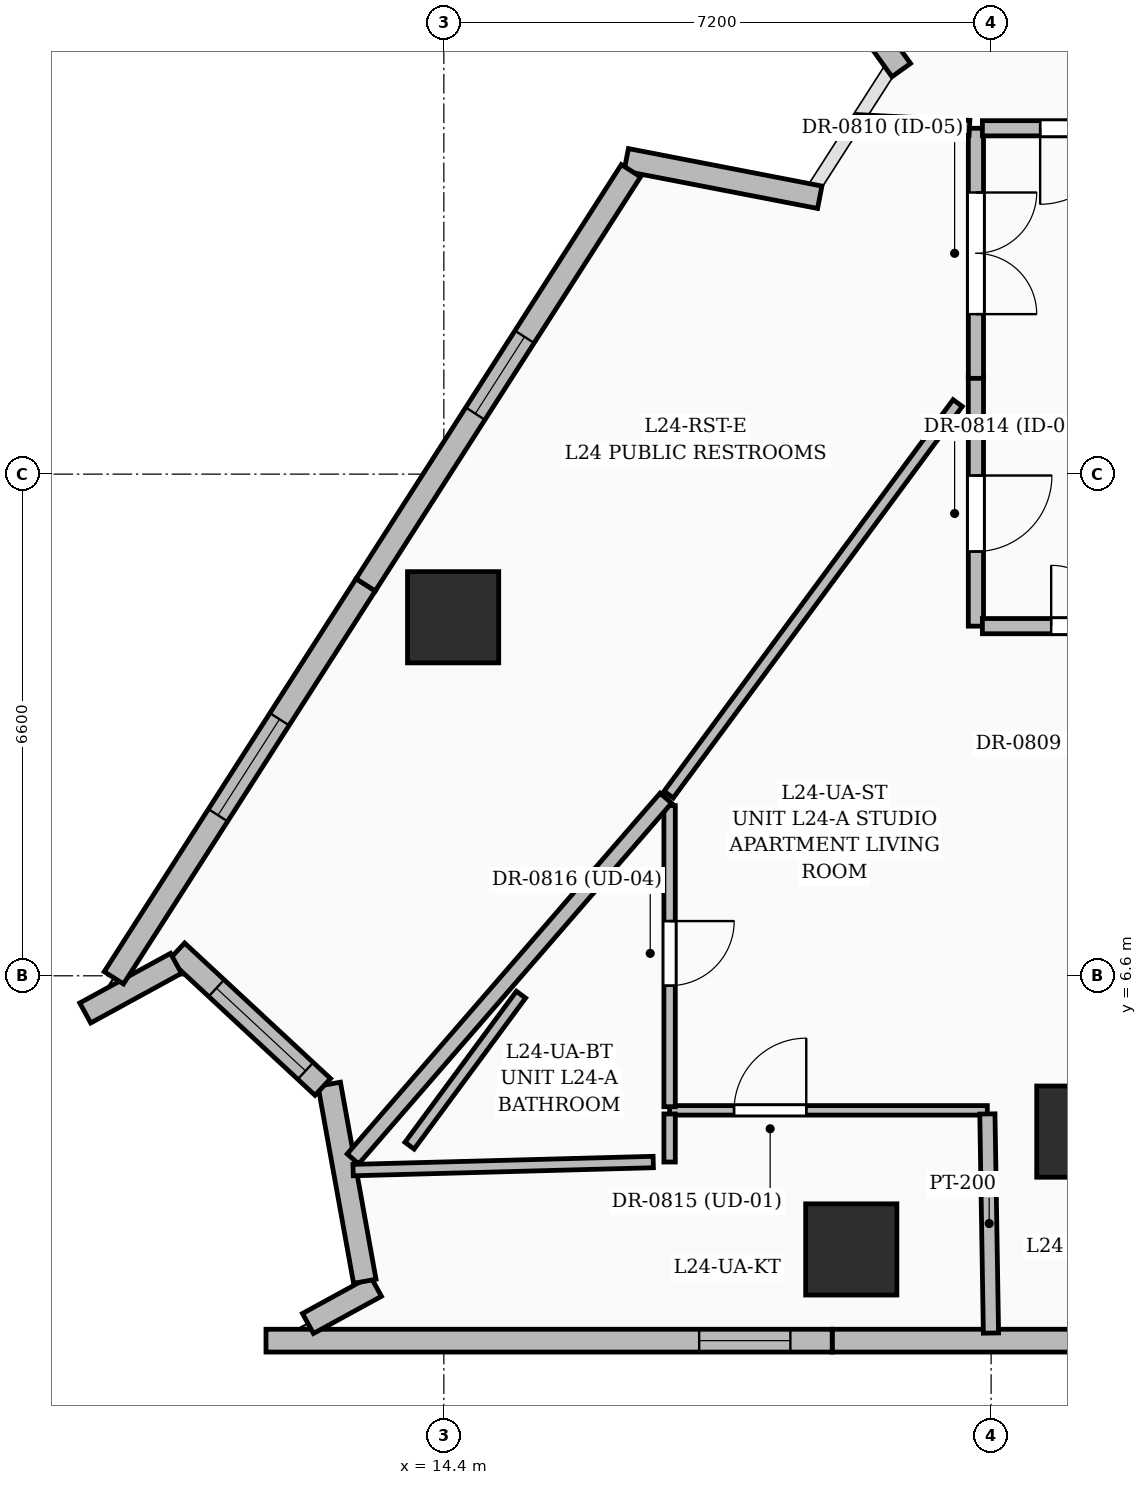
"""IFC4 building model, lengths in metres.
Left out: names, types, materials, properties, quantities, classifications, styles, units other than length and angle.
Written with IfcOpenShell. Run it as: python <this file> out.ifc"""

import sys

from ifc_helpers import new_model, si_unit, direction, frame, frame_2d, origin, origin_2d, place, context, subcontext, project, spatial, rectangle, extrude, element, fill, save


model = new_model("IFC4")
c1 = context("Model", 3, precision=1e-05, world=origin(), true_north=direction((0.0, 1.0)))
c2 = subcontext(c1, "Body", "Model", "MODEL_VIEW")
j1 = project(units=[si_unit("LENGTHUNIT", "METRE"), si_unit("PLANEANGLEUNIT", "RADIAN")], contexts=[c1])
p1 = place(None, origin())
s1 = spatial("IfcSite", under=j1, at=p1, CompositionType="ELEMENT")
p2 = place(p1, origin())
s2 = spatial("IfcBuilding", under=s1, at=p2, CompositionType="ELEMENT")
p3 = place(p2, frame((0.0, 0.0, 96.6)))
s3 = spatial("IfcBuildingStorey", under=s2, at=p3, CompositionType="ELEMENT", Elevation=96.6)
for number, where, z_axis, x_axis in (
    (1, (22.8, 4.55, 0.0), (0.0, 0.0, 1.0), (1.0, 0.0, 0.0)),
    (2, (19.76, 3.0, 0.0), (0.0, 0.0, 1.0), (1.0, 0.0, 0.0)),
    (3, (14.522, 11.317, 0.0), (0.0, 0.0, 1.0), (1.0, 0.0, 0.0)),
):
    element("IfcColumn", number, at=place(p3, frame(where, z_axis=z_axis, x_axis=x_axis)), inside=s3, PredefinedType="COLUMN", context=c2, shape_type="SweptSolid", body=[
        extrude(rectangle(XDim=1.2, YDim=1.2, at=origin_2d()), origin(), (0.0, 0.0, 1.0), 3.6),
    ])
p4 = place(p3, frame((16.8, 17.336, 0.0), z_axis=(0.0, 0.0, 1.0), x_axis=(0.981732795781, -0.190264861936, 0.0)))
e4 = element("IfcWall", 4, at=p4, inside=s3, PredefinedType="SOLIDWALL", context=c2, shape_type="SweptSolid", body=[
    extrude(rectangle(XDim=2.593, YDim=0.3, at=frame_2d((1.297, 0.0))), origin(), (0.0, 0.0, 1.0), 2.325),
])
p5 = place(p3, frame((20.417, 18.515, 0.0), z_axis=(0.0, 0.0, 1.0), x_axis=(-0.582937596749, 0.812516928006, 0.0)))
e5 = element("IfcWall", 5, at=p5, inside=s3, PredefinedType="SOLIDWALL", context=c2, shape_type="SweptSolid", body=[
    extrude(rectangle(XDim=2.594, YDim=0.3, at=frame_2d((1.297, 0.0))), origin(), (0.0, 0.0, 1.0), 2.325),
])
p6 = place(p3, frame((26.958, 1.8, 0.0), z_axis=(0.0, 0.0, 1.0), x_axis=(-1.0, 0.0, 0.0)))
e6 = element("IfcWall", 6, at=p6, inside=s3, PredefinedType="SOLIDWALL", context=c2, shape_type="SweptSolid", body=[
    extrude(rectangle(XDim=7.449, YDim=0.3, at=frame_2d((3.725, 0.0))), origin(), (0.0, 0.0, 1.0), 3.3),
])
p7 = place(p6, frame((2.025, 0.0, 0.6)))
e7 = element("IfcOpeningElement", 7, at=p7, cuts=e6, PredefinedType="OPENING", context=c2, shape_type="SweptSolid", body=[
    extrude(rectangle(XDim=1.5, YDim=2.1, at=frame_2d((0.75, 1.05))), frame((0.0, 0.16, 0.0), z_axis=(0.0, -1.0, 0.0), x_axis=(1.0, 0.0, 0.0)), (0.0, 0.0, 1.0), 0.32),
])
p8 = place(p3, frame((19.509, 1.8, 0.0), z_axis=(0.0, 0.0, 1.0), x_axis=(-1.0, 0.0, 0.0)))
e8 = element("IfcWall", 8, at=p8, inside=s3, PredefinedType="SOLIDWALL", context=c2, shape_type="SweptSolid", body=[
    extrude(rectangle(XDim=7.449, YDim=0.3, at=frame_2d((3.725, 0.0))), origin(), (0.0, 0.0, 1.0), 3.3),
])
p9 = place(p8, frame((0.55, 0.0, 0.8)))
e9 = element("IfcOpeningElement", 9, at=p9, cuts=e8, PredefinedType="OPENING", context=c2, shape_type="SweptSolid", body=[
    extrude(rectangle(XDim=1.2, YDim=1.8, at=frame_2d((0.6, 0.9))), frame((0.0, 0.16, 0.0), z_axis=(0.0, -1.0, 0.0), x_axis=(1.0, 0.0, 0.0)), (0.0, 0.0, 1.0), 0.32),
])
p10 = place(p3, frame((12.612, 2.026, 0.0), z_axis=(0.0, 0.0, 1.0), x_axis=(0.877245120991, 0.480042704036, 0.0)))
e10 = element("IfcWall", 10, at=p10, inside=s3, PredefinedType="SOLIDWALL", context=c2, shape_type="SweptSolid", body=[
    extrude(rectangle(XDim=1.02, YDim=0.3, at=frame_2d((0.51, 0.0))), origin(), (0.0, 0.0, 1.0), 3.3),
])
p11 = place(p3, frame((13.36, 2.581, 0.0), z_axis=(0.0, 0.0, 1.0), x_axis=(-0.177621463404, 0.984098885142, 0.0)))
e11 = element("IfcWall", 11, at=p11, inside=s3, PredefinedType="SOLIDWALL", context=c2, shape_type="SweptSolid", body=[
    extrude(rectangle(XDim=2.635, YDim=0.3, at=frame_2d((1.317, 0.0))), origin(), (0.0, 0.0, 1.0), 3.3),
])
p12 = place(p3, frame((12.807, 5.138, 0.0), z_axis=(0.0, 0.0, 1.0), x_axis=(-0.732670686937, 0.680583326642, 0.0)))
e12 = element("IfcWall", 12, at=p12, inside=s3, PredefinedType="SOLIDWALL", context=c2, shape_type="SweptSolid", body=[
    extrude(rectangle(XDim=2.62, YDim=0.3, at=frame_2d((1.31, 0.0))), origin(), (0.0, 0.0, 1.0), 3.3),
])
p13 = place(p12, frame((0.31, 0.0, 0.55)))
e13 = element("IfcOpeningElement", 13, at=p13, cuts=e12, PredefinedType="OPENING", context=c2, shape_type="SweptSolid", body=[
    extrude(rectangle(XDim=1.6, YDim=2.2, at=frame_2d((0.8, 1.1))), frame((0.0, 0.16, 0.0), z_axis=(0.0, -1.0, 0.0), x_axis=(1.0, 0.0, 0.0)), (0.0, 0.0, 1.0), 0.32),
])
p14 = place(p3, frame((10.876, 6.764, 0.0), z_axis=(0.0, 0.0, 1.0), x_axis=(-0.877387661902, -0.47978212841, 0.0)))
e14 = element("IfcWall", 14, at=p14, inside=s3, PredefinedType="SOLIDWALL", context=c2, shape_type="SweptSolid", body=[
    extrude(rectangle(XDim=1.361, YDim=0.3, at=frame_2d((0.68, 0.0))), origin(), (0.0, 0.0, 1.0), 3.3),
])
p15 = place(p3, frame((10.059, 6.574, 0.0), z_axis=(0.0, 0.0, 1.0), x_axis=(0.539504958898, 0.841982422218, 0.0)))
e15 = element("IfcWall", 15, at=p15, inside=s3, PredefinedType="SOLIDWALL", context=c2, shape_type="SweptSolid", body=[
    extrude(rectangle(XDim=6.14, YDim=0.3, at=frame_2d((3.07, 0.0))), origin(), (0.0, 0.0, 1.0), 3.3),
])
p16 = place(p15, frame((2.54, 0.0, 0.6)))
e16 = element("IfcOpeningElement", 16, at=p16, cuts=e15, PredefinedType="OPENING", context=c2, shape_type="SweptSolid", body=[
    extrude(rectangle(XDim=1.5, YDim=2.1, at=frame_2d((0.75, 1.05))), frame((0.0, 0.16, 0.0), z_axis=(0.0, -1.0, 0.0), x_axis=(1.0, 0.0, 0.0)), (0.0, 0.0, 1.0), 0.32),
])
p17 = place(p3, frame((13.371, 11.743, 0.0), z_axis=(0.0, 0.0, 1.0), x_axis=(0.539456253254, 0.842013628646, 0.0)))
e17 = element("IfcWall", 17, at=p17, inside=s3, PredefinedType="SOLIDWALL", context=c2, shape_type="SweptSolid", body=[
    extrude(rectangle(XDim=6.47, YDim=0.3, at=frame_2d((3.235, 0.0))), origin(), (0.0, 0.0, 1.0), 3.3),
])
p18 = place(p17, frame((2.675, 0.0, 0.8)))
e18 = element("IfcOpeningElement", 18, at=p18, cuts=e17, PredefinedType="OPENING", context=c2, shape_type="SweptSolid", body=[
    extrude(rectangle(XDim=1.2, YDim=1.8, at=frame_2d((0.6, 0.9))), frame((0.0, 0.16, 0.0), z_axis=(0.0, -1.0, 0.0), x_axis=(1.0, 0.0, 0.0)), (0.0, 0.0, 1.0), 0.32),
])
p19 = place(p3, frame((21.4, 14.5, 0.0), z_axis=(0.0, 0.0, 1.0), x_axis=(0.0, -1.0, 0.0)))
e19 = element("IfcWall", 19, at=p19, inside=s3, PredefinedType="PARTITIONING", context=c2, shape_type="SweptSolid", body=[
    extrude(rectangle(XDim=3.3, YDim=0.2, at=frame_2d((1.65, 0.0))), origin(), (0.0, 0.0, 1.0), 2.81),
])
p20 = place(p19, frame((1.318, 0.0, 0.0)))
e20 = element("IfcOpeningElement", 20, at=p20, cuts=e19, PredefinedType="OPENING", context=c2, shape_type="SweptSolid", body=[
    extrude(rectangle(XDim=1.0, YDim=2.2, at=frame_2d((0.5, 1.1))), frame((0.0, 0.11, 0.0), z_axis=(0.0, -1.0, 0.0), x_axis=(1.0, 0.0, 0.0)), (0.0, 0.0, 1.0), 0.22),
])
p21 = place(p3, frame((21.485, 11.2, 0.0), z_axis=(0.0, 0.0, 1.0), x_axis=(1.0, 0.0, 0.0)))
e21 = element("IfcWall", 21, at=p21, inside=s3, PredefinedType="PARTITIONING", context=c2, shape_type="SweptSolid", body=[
    extrude(rectangle(XDim=3.384, YDim=0.2, at=frame_2d((1.692, 0.0))), origin(), (0.0, 0.0, 1.0), 3.3),
])
p22 = place(p21, frame((0.905, 0.0, 0.0)))
e22 = element("IfcOpeningElement", 22, at=p22, cuts=e21, PredefinedType="OPENING", context=c2, shape_type="SweptSolid", body=[
    extrude(rectangle(XDim=1.6, YDim=2.3, at=frame_2d((0.8, 1.15))), frame((0.0, 0.11, 0.0), z_axis=(0.0, -1.0, 0.0), x_axis=(1.0, 0.0, 0.0)), (0.0, 0.0, 1.0), 0.22),
])
p23 = place(p3, frame((21.4, 17.75, 0.0), z_axis=(0.0, 0.0, 1.0), x_axis=(0.0, -1.0, 0.0)))
e23 = element("IfcWall", 23, at=p23, inside=s3, PredefinedType="PARTITIONING", context=c2, shape_type="SweptSolid", body=[
    extrude(rectangle(XDim=3.29, YDim=0.2, at=frame_2d((1.645, 0.0))), origin(), (0.0, 0.0, 1.0), 2.81),
])
p24 = place(p23, frame((0.845, 0.0, 0.0)))
e24 = element("IfcOpeningElement", 24, at=p24, cuts=e23, PredefinedType="OPENING", context=c2, shape_type="SweptSolid", body=[
    extrude(rectangle(XDim=1.6, YDim=2.3, at=frame_2d((0.8, 1.15))), frame((0.0, 0.11, 0.0), z_axis=(0.0, -1.0, 0.0), x_axis=(1.0, 0.0, 0.0)), (0.0, 0.0, 1.0), 0.22),
])
p25 = place(p3, frame((24.09, 17.75, 0.0), z_axis=(0.0, 0.0, 1.0), x_axis=(-1.0, 0.0, 0.0)))
e25 = element("IfcWall", 25, at=p25, inside=s3, PredefinedType="PARTITIONING", context=c2, shape_type="SweptSolid", body=[
    extrude(rectangle(XDim=2.605, YDim=0.2, at=frame_2d((1.302, 0.0))), origin(), (0.0, 0.0, 1.0), 2.295),
])
p26 = place(p25, frame((0.845, 0.0, 0.0)))
e26 = element("IfcOpeningElement", 26, at=p26, cuts=e25, PredefinedType="OPENING", context=c2, shape_type="SweptSolid", body=[
    extrude(rectangle(XDim=1.0, YDim=2.2, at=frame_2d((0.5, 1.1))), frame((0.0, 0.11, 0.0), z_axis=(0.0, -1.0, 0.0), x_axis=(1.0, 0.0, 0.0)), (0.0, 0.0, 1.0), 0.22),
])
p27 = place(p3, frame((17.37, 4.83, 0.0), z_axis=(0.0, 0.0, 1.0), x_axis=(1.0, 0.0, 0.0)))
e27 = element("IfcWall", 27, at=p27, inside=s3, PredefinedType="PARTITIONING", context=c2, shape_type="SweptSolid", body=[
    extrude(rectangle(XDim=4.18, YDim=0.125, at=frame_2d((2.09, 0.0))), origin(), (0.0, 0.0, 1.0), 2.32),
])
p28 = place(p27, frame((0.848, 0.0, 0.0)))
e28 = element("IfcOpeningElement", 28, at=p28, cuts=e27, PredefinedType="OPENING", context=c2, shape_type="SweptSolid", body=[
    extrude(rectangle(XDim=0.95, YDim=2.2, at=frame_2d((0.475, 1.1))), frame((0.0, 0.072, 0.0), z_axis=(0.0, -1.0, 0.0), x_axis=(1.0, 0.0, 0.0)), (0.0, 0.0, 1.0), 0.145),
])
p29 = place(p3, frame((17.37, 8.84, 0.0), z_axis=(0.0, 0.0, 1.0), x_axis=(0.0, -1.0, 0.0)))
e29 = element("IfcWall", 29, at=p29, inside=s3, PredefinedType="PARTITIONING", context=c2, shape_type="SweptSolid", body=[
    extrude(rectangle(XDim=3.963, YDim=0.15, at=frame_2d((1.981, 0.0))), origin(), (0.0, 0.0, 1.0), 2.32),
])
p30 = place(p29, frame((1.52, 0.0, 0.0)))
e30 = element("IfcOpeningElement", 30, at=p30, cuts=e29, PredefinedType="OPENING", context=c2, shape_type="SweptSolid", body=[
    extrude(rectangle(XDim=0.85, YDim=2.1, at=frame_2d((0.425, 1.05))), frame((0.0, 0.085, 0.0), z_axis=(0.0, -1.0, 0.0), x_axis=(1.0, 0.0, 0.0)), (0.0, 0.0, 1.0), 0.17),
])
p31 = place(p3, frame((17.37, 4.782, 0.0), z_axis=(0.0, 0.0, 1.0), x_axis=(0.0, -1.0, 0.0)))
e31 = element("IfcWall", 31, at=p31, inside=s3, PredefinedType="PARTITIONING", context=c2, shape_type="SweptSolid", body=[
    extrude(rectangle(XDim=0.633, YDim=0.15, at=frame_2d((0.316, 0.0))), origin(), (0.0, 0.0, 1.0), 3.3),
])
p32 = place(p3, frame((21.598, 1.9, 0.0), z_axis=(0.0, 0.0, 1.0), x_axis=(-0.01634405187, 0.999866427063, 0.0)))
e32 = element("IfcWall", 32, at=p32, inside=s3, PredefinedType="PARTITIONING", context=c2, shape_type="SweptSolid", body=[
    extrude(rectangle(XDim=2.883, YDim=0.2, at=frame_2d((1.441, 0.0))), origin(), (0.0, 0.0, 1.0), 2.295),
])
p33 = place(p3, frame((17.32, 8.937, 0.0), z_axis=(0.0, 0.0, 1.0), x_axis=(-0.6551775694, -0.755474918548, 0.0)))
e33 = element("IfcWall", 33, at=p33, inside=s3, PredefinedType="PARTITIONING", context=c2, shape_type="SweptSolid", body=[
    extrude(rectangle(XDim=6.282, YDim=0.2, at=frame_2d((3.141, 0.0))), origin(), (0.0, 0.0, 1.0), 2.32),
])
p34 = place(p3, frame((21.315, 17.754, 0.0), z_axis=(0.0, 0.0, 1.0), x_axis=(-0.998681222662, 0.05134019383, 0.0)))
e34 = element("IfcWall", 34, at=p34, inside=s3, PredefinedType="PARTITIONING", context=c2, shape_type="SweptSolid", body=[
    extrude(rectangle(XDim=1.493, YDim=0.2, at=frame_2d((0.747, 0.0))), origin(), (0.0, 0.0, 1.0), 3.3),
])
p35 = place(p3, frame((13.206, 4.044, 0.0), z_axis=(0.0, 0.0, 1.0), x_axis=(0.999640228741, 0.026821876926, 0.0)))
e35 = element("IfcWall", 35, at=p35, inside=s3, PredefinedType="PARTITIONING", context=c2, shape_type="SweptSolid", body=[
    extrude(rectangle(XDim=3.95, YDim=0.15, at=frame_2d((1.975, 0.0))), origin(), (0.0, 0.0, 1.0), 3.3),
])
p36 = place(p3, frame((15.415, 6.352, 0.0), z_axis=(0.0, 0.0, 1.0), x_axis=(-0.593701426761, -0.804685414222, 0.0)))
e36 = element("IfcWall", 36, at=p36, inside=s3, PredefinedType="PARTITIONING", context=c2, shape_type="SweptSolid", body=[
    extrude(rectangle(XDim=2.469, YDim=0.15, at=frame_2d((1.235, 0.0))), origin(), (0.0, 0.0, 1.0), 3.3),
])
p37 = place(p3, frame((17.358, 8.984, 0.0), z_axis=(0.0, 0.0, 1.0), x_axis=(0.593868754029, 0.804561932351, 0.0)))
e37 = element("IfcWall", 37, at=p37, inside=s3, PredefinedType="PARTITIONING", context=c2, shape_type="SweptSolid", body=[
    extrude(rectangle(XDim=6.402, YDim=0.15, at=frame_2d((3.201, 0.0))), origin(), (0.0, 0.0, 1.0), 2.295),
])
p38 = place(p9, origin())
e38 = element("IfcWindow", 38, at=p38, inside=s3, PartitioningType="SINGLE_PANEL", PredefinedType="WINDOW", context=c2, shape_type="SweptSolid", body=[
    extrude(rectangle(XDim=1.2, YDim=1.8, at=frame_2d((0.6, 0.9))), frame((0.0, 0.03, 0.0), z_axis=(0.0, -1.0, 0.0), x_axis=(1.0, 0.0, 0.0)), (0.0, 0.0, 1.0), 0.06),
])
fill(e9, e38)
p39 = place(p13, origin())
e39 = element("IfcWindow", 39, at=p39, inside=s3, PartitioningType="SINGLE_PANEL", PredefinedType="WINDOW", context=c2, shape_type="SweptSolid", body=[
    extrude(rectangle(XDim=1.6, YDim=2.2, at=frame_2d((0.8, 1.1))), frame((0.0, 0.03, 0.0), z_axis=(0.0, -1.0, 0.0), x_axis=(1.0, 0.0, 0.0)), (0.0, 0.0, 1.0), 0.06),
])
fill(e13, e39)
p40 = place(p16, origin())
e40 = element("IfcWindow", 40, at=p40, inside=s3, PartitioningType="SINGLE_PANEL", PredefinedType="WINDOW", context=c2, shape_type="SweptSolid", body=[
    extrude(rectangle(XDim=1.5, YDim=2.1, at=frame_2d((0.75, 1.05))), frame((0.0, 0.03, 0.0), z_axis=(0.0, -1.0, 0.0), x_axis=(1.0, 0.0, 0.0)), (0.0, 0.0, 1.0), 0.06),
])
fill(e16, e40)
p41 = place(p18, origin())
e41 = element("IfcWindow", 41, at=p41, inside=s3, PartitioningType="SINGLE_PANEL", PredefinedType="WINDOW", context=c2, shape_type="SweptSolid", body=[
    extrude(rectangle(XDim=1.2, YDim=1.8, at=frame_2d((0.6, 0.9))), frame((0.0, 0.03, 0.0), z_axis=(0.0, -1.0, 0.0), x_axis=(1.0, 0.0, 0.0)), (0.0, 0.0, 1.0), 0.06),
])
fill(e18, e41)
p42 = place(p22, origin())
e42 = element("IfcDoor", 42, at=p42, inside=s3, OperationType="DOUBLE_DOOR_SINGLE_SWING", PredefinedType="DOOR", context=c2, shape_type="SweptSolid", body=[
    extrude(rectangle(XDim=1.6, YDim=2.3, at=frame_2d((0.8, 1.15))), frame((0.0, 0.025, 0.0), z_axis=(0.0, -1.0, 0.0), x_axis=(1.0, 0.0, 0.0)), (0.0, 0.0, 1.0), 0.05),
])
fill(e22, e42)
p43 = place(p24, origin())
e43 = element("IfcDoor", 43, at=p43, inside=s3, OperationType="DOUBLE_DOOR_SINGLE_SWING", PredefinedType="DOOR", context=c2, shape_type="SweptSolid", body=[
    extrude(rectangle(XDim=1.6, YDim=2.3, at=frame_2d((0.8, 1.15))), frame((0.0, 0.025, 0.0), z_axis=(0.0, -1.0, 0.0), x_axis=(1.0, 0.0, 0.0)), (0.0, 0.0, 1.0), 0.05),
])
fill(e24, e43)
p44 = place(p20, origin())
e44 = element("IfcDoor", 44, at=p44, inside=s3, OperationType="SINGLE_SWING_LEFT", PredefinedType="DOOR", context=c2, shape_type="SweptSolid", body=[
    extrude(rectangle(XDim=1.0, YDim=2.2, at=frame_2d((0.5, 1.1))), frame((0.0, 0.025, 0.0), z_axis=(0.0, -1.0, 0.0), x_axis=(1.0, 0.0, 0.0)), (0.0, 0.0, 1.0), 0.05),
])
fill(e20, e44)
p45 = place(p28, origin())
e45 = element("IfcDoor", 45, at=p45, inside=s3, OperationType="SINGLE_SWING_RIGHT", PredefinedType="DOOR", context=c2, shape_type="SweptSolid", body=[
    extrude(rectangle(XDim=0.95, YDim=2.2, at=frame_2d((0.475, 1.1))), frame((0.0, 0.025, 0.0), z_axis=(0.0, -1.0, 0.0), x_axis=(1.0, 0.0, 0.0)), (0.0, 0.0, 1.0), 0.05),
])
fill(e28, e45)
p46 = place(p30, origin())
e46 = element("IfcDoor", 46, at=p46, inside=s3, OperationType="SINGLE_SWING_LEFT", PredefinedType="DOOR", context=c2, shape_type="SweptSolid", body=[
    extrude(rectangle(XDim=0.85, YDim=2.1, at=frame_2d((0.425, 1.05))), frame((0.0, 0.025, 0.0), z_axis=(0.0, -1.0, 0.0), x_axis=(1.0, 0.0, 0.0)), (0.0, 0.0, 1.0), 0.05),
])
fill(e30, e46)
p47 = place(p26, origin())
e47 = element("IfcDoor", 47, at=p47, inside=s3, OperationType="SINGLE_SWING_RIGHT", PredefinedType="DOOR", context=c2, shape_type="SweptSolid", body=[
    extrude(rectangle(XDim=1.0, YDim=2.2, at=frame_2d((0.5, 1.1))), frame((0.0, 0.025, 0.0), z_axis=(0.0, -1.0, 0.0), x_axis=(1.0, 0.0, 0.0)), (0.0, 0.0, 1.0), 0.05),
])
fill(e26, e47)
save(model, sys.argv[1])
